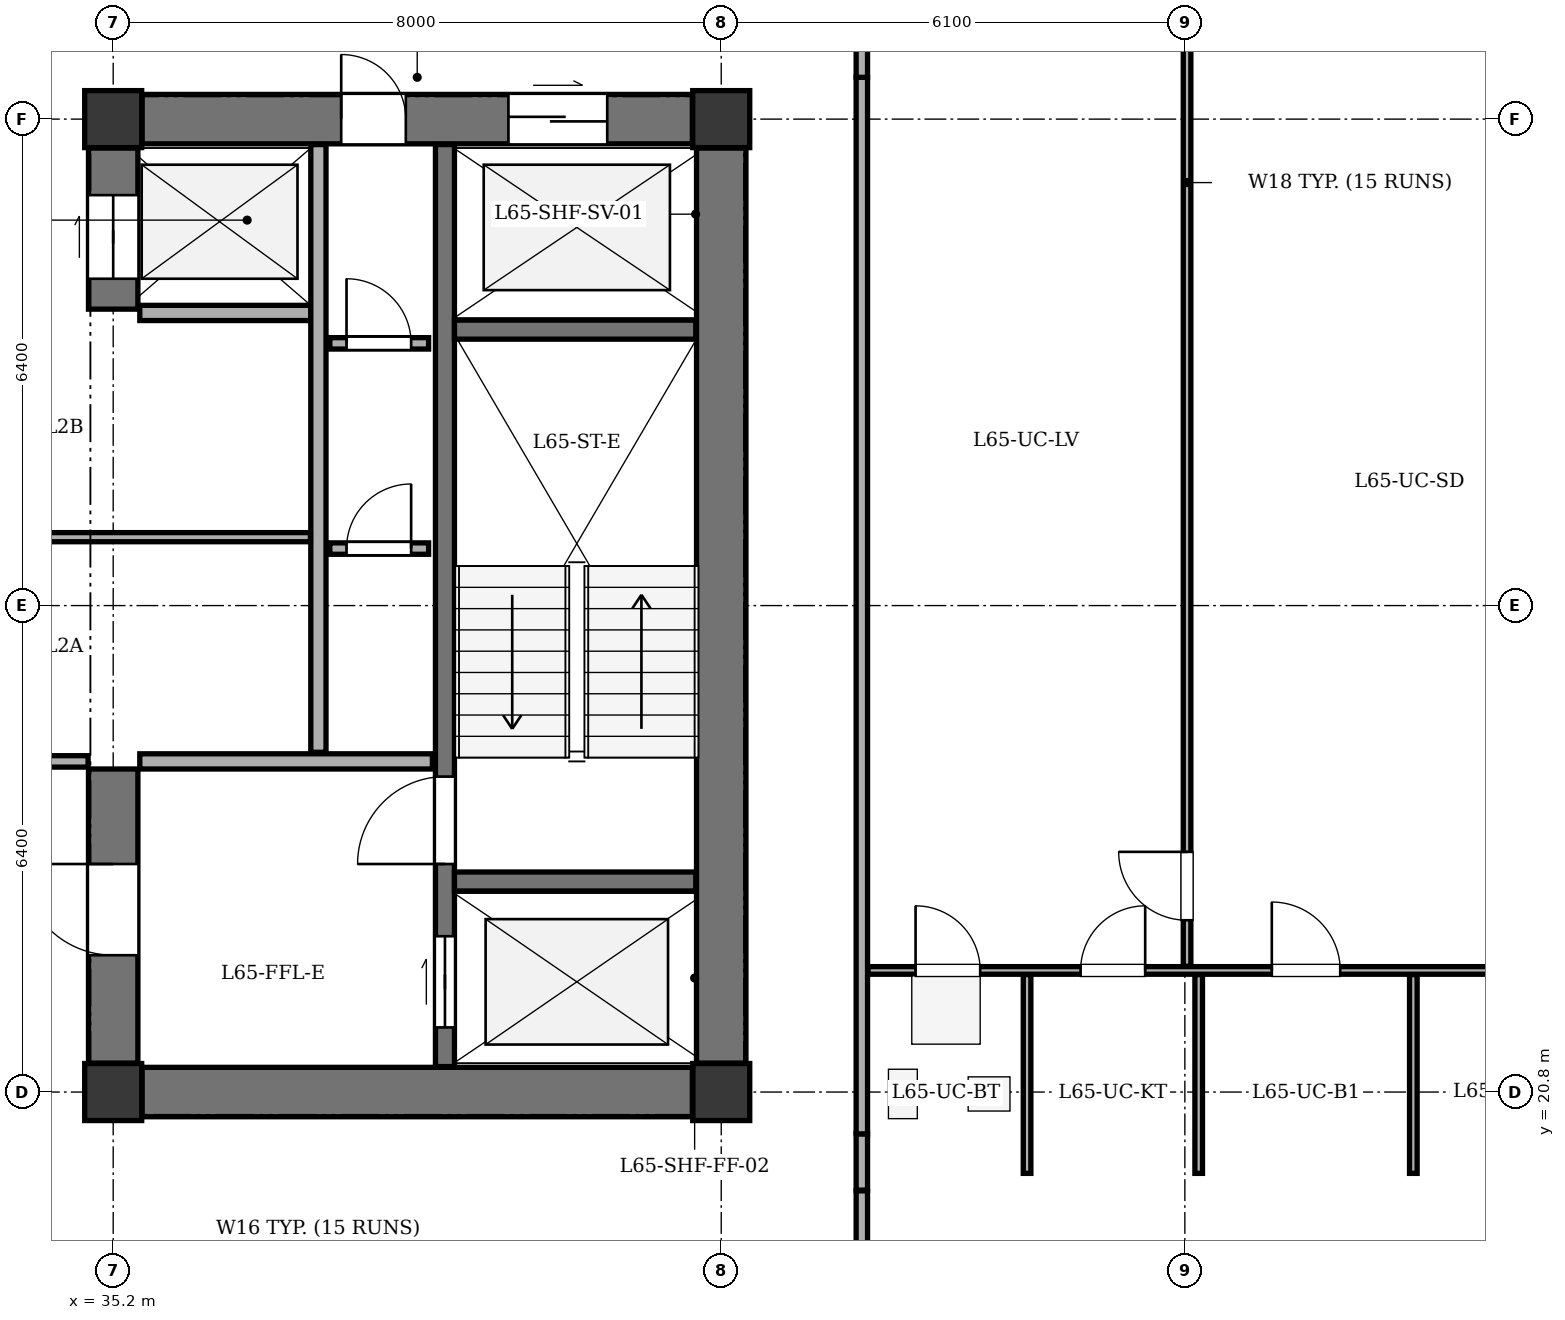
"""IFC4 building model, lengths in metres.
Left out: names, types, materials, properties, quantities, classifications, styles, units other than length and angle.
Written with IfcOpenShell. Run it as: python <this file> out.ifc"""

import sys

from ifc_helpers import new_model, si_unit, direction, frame, frame_2d, origin, origin_2d, place, context, subcontext, project, spatial, rectangle, extrude, element, fill, save


model = new_model("IFC4")
c1 = context("Model", 3, precision=1e-05, world=origin(), true_north=direction((0.0, 1.0)))
c2 = subcontext(c1, "Body", "Model", "MODEL_VIEW")
j1 = project(units=[si_unit("LENGTHUNIT", "METRE"), si_unit("PLANEANGLEUNIT", "RADIAN")], contexts=[c1])
p1 = place(None, origin())
s1 = spatial("IfcSite", under=j1, at=p1, CompositionType="ELEMENT")
p2 = place(p1, origin())
s2 = spatial("IfcBuilding", under=s1, at=p2, CompositionType="ELEMENT")
p3 = place(p2, frame((0.0, 0.0, 248.3)))
s3 = spatial("IfcBuildingStorey", under=s2, at=p3, CompositionType="ELEMENT", Elevation=248.3)
for number, where, z_axis, x_axis in (
    (1, (35.2, 20.8, 0.0), (0.0, 0.0, 1.0), (1.0, 0.0, 0.0)),
    (2, (43.2, 20.8, 0.0), (0.0, 0.0, 1.0), (1.0, 0.0, 0.0)),
    (3, (35.2, 33.6, 0.0), (0.0, 0.0, 1.0), (1.0, 0.0, 0.0)),
    (4, (43.2, 33.6, 0.0), (0.0, 0.0, 1.0), (1.0, 0.0, 0.0)),
):
    element("IfcColumn", number, at=place(p3, frame(where, z_axis=z_axis, x_axis=x_axis)), inside=s3, PredefinedType="COLUMN", context=c2, shape_type="SweptSolid", body=[
        extrude(rectangle(XDim=0.75, YDim=0.75, at=origin_2d()), origin(), (0.0, 0.0, 1.0), 3.4),
    ])
p4 = place(p3, frame((55.52, 19.85, 0.0), z_axis=(0.0, 0.0, 1.0), x_axis=(-0.707106781187, -0.707106781187, 0.0)))
e5 = element("IfcWall", 5, at=p4, inside=s3, PredefinedType="STANDARD", context=c2, shape_type="SweptSolid", body=[
    extrude(rectangle(XDim=5.402, YDim=0.32, at=frame_2d((2.701, 0.0))), origin(), (0.0, 0.0, 1.0), 2.725),
])
p5 = place(p4, frame((2.001, 0.0, 0.75)))
e6 = element("IfcOpeningElement", 6, at=p5, cuts=e5, PredefinedType="OPENING", context=c2, shape_type="SweptSolid", body=[
    extrude(rectangle(XDim=1.4, YDim=1.65, at=frame_2d((0.7, 0.825))), frame((0.0, 0.17, 0.0), z_axis=(0.0, -1.0, 0.0), x_axis=(1.0, 0.0, 0.0)), (0.0, 0.0, 1.0), 0.34),
])
p6 = place(p3, frame((43.2, 21.18, 0.0), z_axis=(0.0, 0.0, 1.0), x_axis=(0.0, 1.0, 0.0)))
e7 = element("IfcWall", 7, at=p6, inside=s3, PredefinedType="SHEAR", context=c2, shape_type="SweptSolid", body=[
    extrude(rectangle(XDim=12.04, YDim=0.65, at=frame_2d((6.02, 0.0))), origin(), (0.0, 0.0, 1.0), 3.1),
])
p7 = place(p3, frame((35.58, 20.8, 0.0), z_axis=(0.0, 0.0, 1.0), x_axis=(1.0, 0.0, 0.0)))
e8 = element("IfcWall", 8, at=p7, inside=s3, PredefinedType="SHEAR", context=c2, shape_type="SweptSolid", body=[
    extrude(rectangle(XDim=7.24, YDim=0.65, at=frame_2d((3.62, 0.0))), origin(), (0.0, 0.0, 1.0), 3.1),
])
p8 = place(p3, frame((35.58, 33.6, 0.0), z_axis=(0.0, 0.0, 1.0), x_axis=(1.0, 0.0, 0.0)))
e9 = element("IfcWall", 9, at=p8, inside=s3, PredefinedType="SHEAR", context=c2, shape_type="SweptSolid", body=[
    extrude(rectangle(XDim=7.24, YDim=0.65, at=frame_2d((3.62, 0.0))), origin(), (0.0, 0.0, 1.0), 3.1),
])
p9 = place(p8, frame((4.82, 0.0, 0.0)))
e10 = element("IfcOpeningElement", 10, at=p9, cuts=e9, PredefinedType="OPENING", context=c2, shape_type="SweptSolid", body=[
    extrude(rectangle(XDim=1.3, YDim=2.15, at=frame_2d((0.65, 1.075))), frame((0.0, 0.335, 0.0), z_axis=(0.0, -1.0, 0.0), x_axis=(1.0, 0.0, 0.0)), (0.0, 0.0, 1.0), 0.67),
])
p10 = place(p8, frame((2.62, 0.0, 0.0)))
e11 = element("IfcOpeningElement", 11, at=p10, cuts=e9, PredefinedType="OPENING", context=c2, shape_type="SweptSolid", body=[
    extrude(rectangle(XDim=0.85, YDim=2.02, at=frame_2d((0.425, 1.01))), frame((0.0, 0.335, 0.0), z_axis=(0.0, -1.0, 0.0), x_axis=(1.0, 0.0, 0.0)), (0.0, 0.0, 1.0), 0.67),
])
p11 = place(p3, frame((35.2, 21.18, 0.0), z_axis=(0.0, 0.0, 1.0), x_axis=(0.0, 1.0, 0.0)))
e12 = element("IfcWall", 12, at=p11, inside=s3, PredefinedType="SHEAR", context=c2, shape_type="SweptSolid", body=[
    extrude(rectangle(XDim=3.87, YDim=0.65, at=frame_2d((1.935, 0.0))), origin(), (0.0, 0.0, 1.0), 3.1),
])
p12 = place(p11, frame((1.42, 0.0, 0.0)))
e13 = element("IfcOpeningElement", 13, at=p12, cuts=e12, PredefinedType="OPENING", context=c2, shape_type="SweptSolid", body=[
    extrude(rectangle(XDim=1.2, YDim=2.15, at=frame_2d((0.6, 1.075))), frame((0.0, 0.335, 0.0), z_axis=(0.0, -1.0, 0.0), x_axis=(1.0, 0.0, 0.0)), (0.0, 0.0, 1.0), 0.67),
])
p13 = place(p3, frame((35.2, 31.1, 0.0), z_axis=(0.0, 0.0, 1.0), x_axis=(0.0, 1.0, 0.0)))
e14 = element("IfcWall", 14, at=p13, inside=s3, PredefinedType="SHEAR", context=c2, shape_type="SweptSolid", body=[
    extrude(rectangle(XDim=2.12, YDim=0.65, at=frame_2d((1.06, 0.0))), origin(), (0.0, 0.0, 1.0), 3.1),
])
p14 = place(p13, frame((0.4, 0.0, 0.0)))
e15 = element("IfcOpeningElement", 15, at=p14, cuts=e14, PredefinedType="OPENING", context=c2, shape_type="SweptSolid", body=[
    extrude(rectangle(XDim=1.1, YDim=2.1, at=frame_2d((0.55, 1.05))), frame((0.0, 0.335, 0.0), z_axis=(0.0, -1.0, 0.0), x_axis=(1.0, 0.0, 0.0)), (0.0, 0.0, 1.0), 0.67),
])
p15 = place(p3, frame((39.565, 21.135, 0.0), z_axis=(0.0, 0.0, 1.0), x_axis=(0.0, 1.0, 0.0)))
e16 = element("IfcWall", 16, at=p15, inside=s3, PredefinedType="SHEAR", context=c2, shape_type="SweptSolid", body=[
    extrude(rectangle(XDim=12.13, YDim=0.25, at=frame_2d((6.065, 0.0))), origin(), (0.0, 0.0, 1.0), 3.1),
])
p16 = place(p15, frame((0.515, 0.0, 0.0)))
e17 = element("IfcOpeningElement", 17, at=p16, cuts=e16, PredefinedType="OPENING", context=c2, shape_type="SweptSolid", body=[
    extrude(rectangle(XDim=1.2, YDim=2.15, at=frame_2d((0.6, 1.075))), frame((0.0, 0.135, 0.0), z_axis=(0.0, -1.0, 0.0), x_axis=(1.0, 0.0, 0.0)), (0.0, 0.0, 1.0), 0.27),
])
p17 = place(p15, frame((2.665, 0.0, 0.0)))
e18 = element("IfcOpeningElement", 18, at=p17, cuts=e16, PredefinedType="OPENING", context=c2, shape_type="SweptSolid", body=[
    extrude(rectangle(XDim=1.15, YDim=2.15, at=frame_2d((0.575, 1.075))), frame((0.0, 0.135, 0.0), z_axis=(0.0, -1.0, 0.0), x_axis=(1.0, 0.0, 0.0)), (0.0, 0.0, 1.0), 0.27),
])
for number, where, z_axis, x_axis in (
    (19, (39.69, 23.57, 0.0), (0.0, 0.0, 1.0), (1.0, 0.0, 0.0)),
    (20, (39.69, 30.83, 0.0), (0.0, 0.0, 1.0), (1.0, 0.0, 0.0)),
):
    element("IfcWall", number, at=place(p3, frame(where, z_axis=z_axis, x_axis=x_axis)), inside=s3, PredefinedType="SHEAR", context=c2, shape_type="SweptSolid", body=[
        extrude(rectangle(XDim=3.175, YDim=0.25, at=frame_2d((1.587, 0.0))), origin(), (0.0, 0.0, 1.0), 3.1),
    ])
p18 = place(p3, frame((35.55, 25.15, 0.0), z_axis=(0.0, 0.0, 1.0), x_axis=(1.0, 0.0, 0.0)))
e21 = element("IfcWall", 21, at=p18, inside=s3, PredefinedType="SOLIDWALL", context=c2, shape_type="SweptSolid", body=[
    extrude(rectangle(XDim=3.85, YDim=0.2, at=frame_2d((1.925, 0.0))), origin(), (0.0, 0.0, 1.0), 3.1),
])
p19 = place(p3, frame((35.55, 31.05, 0.0), z_axis=(0.0, 0.0, 1.0), x_axis=(1.0, 0.0, 0.0)))
e22 = element("IfcWall", 22, at=p19, inside=s3, PredefinedType="SOLIDWALL", context=c2, shape_type="SweptSolid", body=[
    extrude(rectangle(XDim=2.25, YDim=0.2, at=frame_2d((1.125, 0.0))), origin(), (0.0, 0.0, 1.0), 3.1),
])
p20 = place(p3, frame((37.9, 25.27, 0.0), z_axis=(0.0, 0.0, 1.0), x_axis=(0.0, 1.0, 0.0)))
e23 = element("IfcWall", 23, at=p20, inside=s3, PredefinedType="SOLIDWALL", context=c2, shape_type="SweptSolid", body=[
    extrude(rectangle(XDim=7.995, YDim=0.2, at=frame_2d((3.998, 0.0))), origin(), (0.0, 0.0, 1.0), 3.1),
])
p21 = place(p3, frame((38.05, 27.95, 0.0), z_axis=(0.0, 0.0, 1.0), x_axis=(1.0, 0.0, 0.0)))
e24 = element("IfcWall", 24, at=p21, inside=s3, PredefinedType="PARTITIONING", context=c2, shape_type="SweptSolid", body=[
    extrude(rectangle(XDim=1.3, YDim=0.15, at=frame_2d((0.65, 0.0))), origin(), (0.0, 0.0, 1.0), 3.1),
])
p22 = place(p21, frame((0.22, 0.0, 0.0)))
e25 = element("IfcOpeningElement", 25, at=p22, cuts=e24, PredefinedType="OPENING", context=c2, shape_type="SweptSolid", body=[
    extrude(rectangle(XDim=0.85, YDim=2.02, at=frame_2d((0.425, 1.01))), frame((0.0, 0.085, 0.0), z_axis=(0.0, -1.0, 0.0), x_axis=(1.0, 0.0, 0.0)), (0.0, 0.0, 1.0), 0.17),
])
p23 = place(p3, frame((38.05, 30.65, 0.0), z_axis=(0.0, 0.0, 1.0), x_axis=(1.0, 0.0, 0.0)))
e26 = element("IfcWall", 26, at=p23, inside=s3, PredefinedType="PARTITIONING", context=c2, shape_type="SweptSolid", body=[
    extrude(rectangle(XDim=1.3, YDim=0.15, at=frame_2d((0.65, 0.0))), origin(), (0.0, 0.0, 1.0), 3.1),
])
p24 = place(p23, frame((0.22, 0.0, 0.0)))
e27 = element("IfcOpeningElement", 27, at=p24, cuts=e26, PredefinedType="OPENING", context=c2, shape_type="SweptSolid", body=[
    extrude(rectangle(XDim=0.85, YDim=2.02, at=frame_2d((0.425, 1.01))), frame((0.0, 0.085, 0.0), z_axis=(0.0, -1.0, 0.0), x_axis=(1.0, 0.0, 0.0)), (0.0, 0.0, 1.0), 0.17),
])
p25 = place(p3, frame((29.35, 25.15, 0.0), z_axis=(0.0, 0.0, 1.0), x_axis=(1.0, 0.0, 0.0)))
e28 = element("IfcWall", 28, at=p25, inside=s3, PredefinedType="PARTITIONING", context=c2, shape_type="SweptSolid", body=[
    extrude(rectangle(XDim=5.52, YDim=0.15, at=frame_2d((2.76, 0.0))), origin(), (0.0, 0.0, 1.0), 3.1),
])
p26 = place(p3, frame((29.45, 28.1, 0.0), z_axis=(0.0, 0.0, 1.0), x_axis=(1.0, 0.0, 0.0)))
e29 = element("IfcWall", 29, at=p26, inside=s3, PredefinedType="PARTITIONING", context=c2, shape_type="SweptSolid", body=[
    extrude(rectangle(XDim=8.345, YDim=0.12, at=frame_2d((4.172, 0.0))), origin(), (0.0, 0.0, 1.0), 3.1),
])
p27 = place(p3, frame((45.05, 19.5, 0.0), z_axis=(0.0, 0.0, 1.0), x_axis=(0.0, -1.0, 0.0)))
e30 = element("IfcWall", 30, at=p27, inside=s3, PredefinedType="PARTITIONING", context=c2, shape_type="SweptSolid", body=[
    extrude(rectangle(XDim=0.96, YDim=0.15, at=frame_2d((0.48, 0.0))), origin(), (0.0, 0.0, 1.0), 2.725),
])
p28 = place(p3, frame((45.05, 19.51, 0.0), z_axis=(0.0, 0.0, 1.0), x_axis=(0.0, 1.0, 0.0)))
e31 = element("IfcWall", 31, at=p28, inside=s3, PredefinedType="PARTITIONING", context=c2, shape_type="SweptSolid", body=[
    extrude(rectangle(XDim=0.74, YDim=0.15, at=frame_2d((0.37, 0.0))), origin(), (0.0, 0.0, 1.0), 2.725),
])
p29 = place(p3, frame((45.05, 20.25, 0.0), z_axis=(0.0, 0.0, 1.0), x_axis=(0.0, 1.0, 0.0)))
e32 = element("IfcWall", 32, at=p29, inside=s3, PredefinedType="PARTITIONING", context=c2, shape_type="SweptSolid", body=[
    extrude(rectangle(XDim=13.9, YDim=0.15, at=frame_2d((6.95, 0.0))), origin(), (0.0, 0.0, 1.0), 2.725),
])
p30 = place(p3, frame((45.05, 34.15, 0.0), z_axis=(0.0, 0.0, 1.0), x_axis=(0.0, 1.0, 0.0)))
e33 = element("IfcWall", 33, at=p30, inside=s3, PredefinedType="PARTITIONING", context=c2, shape_type="SweptSolid", body=[
    extrude(rectangle(XDim=1.79, YDim=0.15, at=frame_2d((0.895, 0.0))), origin(), (0.0, 0.0, 1.0), 2.725),
])
p31 = place(p30, frame((0.58, 0.0, 0.0)))
e34 = element("IfcOpeningElement", 34, at=p31, cuts=e33, PredefinedType="OPENING", context=c2, shape_type="SweptSolid", body=[
    extrude(rectangle(XDim=1.0, YDim=2.1, at=frame_2d((0.5, 1.05))), frame((0.0, 0.085, 0.0), z_axis=(0.0, -1.0, 0.0), x_axis=(1.0, 0.0, 0.0)), (0.0, 0.0, 1.0), 0.17),
])
p32 = place(p3, frame((45.13, 22.4, 0.0), z_axis=(0.0, 0.0, 1.0), x_axis=(1.0, 0.0, 0.0)))
e35 = element("IfcWall", 35, at=p32, inside=s3, PredefinedType="PARTITIONING", context=c2, shape_type="SweptSolid", body=[
    extrude(rectangle(XDim=10.225, YDim=0.1, at=frame_2d((5.113, 0.0))), origin(), (0.0, 0.0, 1.0), 3.1),
])
p33 = place(p32, frame((0.627, 0.0, 0.0)))
e36 = element("IfcOpeningElement", 36, at=p33, cuts=e35, PredefinedType="OPENING", context=c2, shape_type="SweptSolid", body=[
    extrude(rectangle(XDim=0.85, YDim=2.05, at=frame_2d((0.425, 1.025))), frame((0.0, 0.06, 0.0), z_axis=(0.0, -1.0, 0.0), x_axis=(1.0, 0.0, 0.0)), (0.0, 0.0, 1.0), 0.12),
])
p34 = place(p32, frame((2.798, 0.0, 0.0)))
e37 = element("IfcOpeningElement", 37, at=p34, cuts=e35, PredefinedType="OPENING", context=c2, shape_type="SweptSolid", body=[
    extrude(rectangle(XDim=0.85, YDim=2.05, at=frame_2d((0.425, 1.025))), frame((0.0, 0.06, 0.0), z_axis=(0.0, -1.0, 0.0), x_axis=(1.0, 0.0, 0.0)), (0.0, 0.0, 1.0), 0.12),
])
p35 = place(p32, frame((5.314, 0.0, 0.0)))
e38 = element("IfcOpeningElement", 38, at=p35, cuts=e35, PredefinedType="OPENING", context=c2, shape_type="SweptSolid", body=[
    extrude(rectangle(XDim=0.9, YDim=2.05, at=frame_2d((0.45, 1.025))), frame((0.0, 0.06, 0.0), z_axis=(0.0, -1.0, 0.0), x_axis=(1.0, 0.0, 0.0)), (0.0, 0.0, 1.0), 0.12),
])
p36 = place(p32, frame((8.138, 0.0, 0.0)))
e39 = element("IfcOpeningElement", 39, at=p36, cuts=e35, PredefinedType="OPENING", context=c2, shape_type="SweptSolid", body=[
    extrude(rectangle(XDim=0.9, YDim=2.05, at=frame_2d((0.45, 1.025))), frame((0.0, 0.06, 0.0), z_axis=(0.0, -1.0, 0.0), x_axis=(1.0, 0.0, 0.0)), (0.0, 0.0, 1.0), 0.12),
])
p37 = place(p3, frame((49.329, 22.455, 0.0), z_axis=(0.0, 0.0, 1.0), x_axis=(0.0, 1.0, 0.0)))
e40 = element("IfcWall", 40, at=p37, inside=s3, PredefinedType="PARTITIONING", context=c2, shape_type="SweptSolid", body=[
    extrude(rectangle(XDim=18.765, YDim=0.1, at=frame_2d((9.382, 0.0))), origin(), (0.0, 0.0, 1.0), 2.725),
])
p38 = place(p37, frame((0.605, 0.0, 0.0)))
e41 = element("IfcOpeningElement", 41, at=p38, cuts=e40, PredefinedType="OPENING", context=c2, shape_type="SweptSolid", body=[
    extrude(rectangle(XDim=0.9, YDim=2.05, at=frame_2d((0.45, 1.025))), frame((0.0, 0.06, 0.0), z_axis=(0.0, -1.0, 0.0), x_axis=(1.0, 0.0, 0.0)), (0.0, 0.0, 1.0), 0.12),
])
for number, where, z_axis, x_axis in (
    (42, (47.224, 19.73, 0.0), (0.0, 0.0, 1.0), (0.0, 1.0, 0.0)),
    (43, (49.482, 19.73, 0.0), (0.0, 0.0, 1.0), (0.0, 1.0, 0.0)),
):
    element("IfcWall", number, at=place(p3, frame(where, z_axis=z_axis, x_axis=x_axis)), inside=s3, PredefinedType="PARTITIONING", context=c2, shape_type="SweptSolid", body=[
        extrude(rectangle(XDim=2.615, YDim=0.1, at=frame_2d((1.308, 0.0))), origin(), (0.0, 0.0, 1.0), 2.725),
    ])
p39 = place(p3, frame((52.306, 19.73, 0.0), z_axis=(0.0, 0.0, 1.0), x_axis=(0.0, 1.0, 0.0)))
e44 = element("IfcWall", 44, at=p39, inside=s3, PredefinedType="PARTITIONING", context=c2, shape_type="SweptSolid", body=[
    extrude(rectangle(XDim=2.615, YDim=0.1, at=frame_2d((1.308, 0.0))), origin(), (0.0, 0.0, 1.0), 3.1),
])
p40 = place(p9, origin())
e45 = element("IfcDoor", 45, at=p40, inside=s3, OperationType="DOUBLE_DOOR_SLIDING", PredefinedType="DOOR", context=c2, shape_type="SweptSolid", body=[
    extrude(rectangle(XDim=1.3, YDim=2.15, at=frame_2d((0.65, 1.075))), frame((0.0, 0.025, 0.0), z_axis=(0.0, -1.0, 0.0), x_axis=(1.0, 0.0, 0.0)), (0.0, 0.0, 1.0), 0.05),
])
fill(e10, e45)
p41 = place(p10, origin())
e46 = element("IfcDoor", 46, at=p41, inside=s3, OperationType="SINGLE_SWING_LEFT", PredefinedType="DOOR", context=c2, shape_type="SweptSolid", body=[
    extrude(rectangle(XDim=0.85, YDim=2.02, at=frame_2d((0.425, 1.01))), frame((0.0, 0.025, 0.0), z_axis=(0.0, -1.0, 0.0), x_axis=(1.0, 0.0, 0.0)), (0.0, 0.0, 1.0), 0.05),
])
fill(e11, e46)
p42 = place(p12, origin())
e47 = element("IfcDoor", 47, at=p42, inside=s3, OperationType="SINGLE_SWING_RIGHT", PredefinedType="DOOR", context=c2, shape_type="SweptSolid", body=[
    extrude(rectangle(XDim=1.2, YDim=2.15, at=frame_2d((0.6, 1.075))), frame((0.0, 0.025, 0.0), z_axis=(0.0, -1.0, 0.0), x_axis=(1.0, 0.0, 0.0)), (0.0, 0.0, 1.0), 0.05),
])
fill(e13, e47)
p43 = place(p14, origin())
e48 = element("IfcDoor", 48, at=p43, inside=s3, OperationType="DOUBLE_DOOR_SLIDING", PredefinedType="DOOR", context=c2, shape_type="SweptSolid", body=[
    extrude(rectangle(XDim=1.1, YDim=2.1, at=frame_2d((0.55, 1.05))), frame((0.0, 0.025, 0.0), z_axis=(0.0, -1.0, 0.0), x_axis=(1.0, 0.0, 0.0)), (0.0, 0.0, 1.0), 0.05),
])
fill(e15, e48)
p44 = place(p16, origin())
e49 = element("IfcDoor", 49, at=p44, inside=s3, OperationType="DOUBLE_DOOR_SLIDING", PredefinedType="DOOR", context=c2, shape_type="SweptSolid", body=[
    extrude(rectangle(XDim=1.2, YDim=2.15, at=frame_2d((0.6, 1.075))), frame((0.0, 0.025, 0.0), z_axis=(0.0, -1.0, 0.0), x_axis=(1.0, 0.0, 0.0)), (0.0, 0.0, 1.0), 0.05),
])
fill(e17, e49)
p45 = place(p17, origin())
e50 = element("IfcDoor", 50, at=p45, inside=s3, OperationType="SINGLE_SWING_LEFT", PredefinedType="DOOR", context=c2, shape_type="SweptSolid", body=[
    extrude(rectangle(XDim=1.15, YDim=2.15, at=frame_2d((0.575, 1.075))), frame((0.0, 0.025, 0.0), z_axis=(0.0, -1.0, 0.0), x_axis=(1.0, 0.0, 0.0)), (0.0, 0.0, 1.0), 0.05),
])
fill(e18, e50)
p46 = place(p22, origin())
e51 = element("IfcDoor", 51, at=p46, inside=s3, OperationType="SINGLE_SWING_RIGHT", PredefinedType="DOOR", context=c2, shape_type="SweptSolid", body=[
    extrude(rectangle(XDim=0.85, YDim=2.02, at=frame_2d((0.425, 1.01))), frame((0.0, 0.025, 0.0), z_axis=(0.0, -1.0, 0.0), x_axis=(1.0, 0.0, 0.0)), (0.0, 0.0, 1.0), 0.05),
])
fill(e25, e51)
p47 = place(p24, origin())
e52 = element("IfcDoor", 52, at=p47, inside=s3, OperationType="SINGLE_SWING_LEFT", PredefinedType="DOOR", context=c2, shape_type="SweptSolid", body=[
    extrude(rectangle(XDim=0.85, YDim=2.02, at=frame_2d((0.425, 1.01))), frame((0.0, 0.025, 0.0), z_axis=(0.0, -1.0, 0.0), x_axis=(1.0, 0.0, 0.0)), (0.0, 0.0, 1.0), 0.05),
])
fill(e27, e52)
p48 = place(p38, origin())
e53 = element("IfcDoor", 53, at=p48, inside=s3, OperationType="SINGLE_SWING_RIGHT", PredefinedType="DOOR", context=c2, shape_type="SweptSolid", body=[
    extrude(rectangle(XDim=0.9, YDim=2.05, at=frame_2d((0.45, 1.025))), frame((0.0, 0.025, 0.0), z_axis=(0.0, -1.0, 0.0), x_axis=(1.0, 0.0, 0.0)), (0.0, 0.0, 1.0), 0.05),
])
fill(e41, e53)
p49 = place(p33, origin())
e54 = element("IfcDoor", 54, at=p49, inside=s3, OperationType="SINGLE_SWING_LEFT", PredefinedType="DOOR", context=c2, shape_type="SweptSolid", body=[
    extrude(rectangle(XDim=0.85, YDim=2.05, at=frame_2d((0.425, 1.025))), frame((0.0, 0.025, 0.0), z_axis=(0.0, -1.0, 0.0), x_axis=(1.0, 0.0, 0.0)), (0.0, 0.0, 1.0), 0.05),
])
fill(e36, e54)
p50 = place(p34, origin())
e55 = element("IfcDoor", 55, at=p50, inside=s3, OperationType="SINGLE_SWING_RIGHT", PredefinedType="DOOR", context=c2, shape_type="SweptSolid", body=[
    extrude(rectangle(XDim=0.85, YDim=2.05, at=frame_2d((0.425, 1.025))), frame((0.0, 0.025, 0.0), z_axis=(0.0, -1.0, 0.0), x_axis=(1.0, 0.0, 0.0)), (0.0, 0.0, 1.0), 0.05),
])
fill(e37, e55)
p51 = place(p35, origin())
e56 = element("IfcDoor", 56, at=p51, inside=s3, OperationType="SINGLE_SWING_LEFT", PredefinedType="DOOR", context=c2, shape_type="SweptSolid", body=[
    extrude(rectangle(XDim=0.9, YDim=2.05, at=frame_2d((0.45, 1.025))), frame((0.0, 0.025, 0.0), z_axis=(0.0, -1.0, 0.0), x_axis=(1.0, 0.0, 0.0)), (0.0, 0.0, 1.0), 0.05),
])
fill(e38, e56)
save(model, sys.argv[1])
